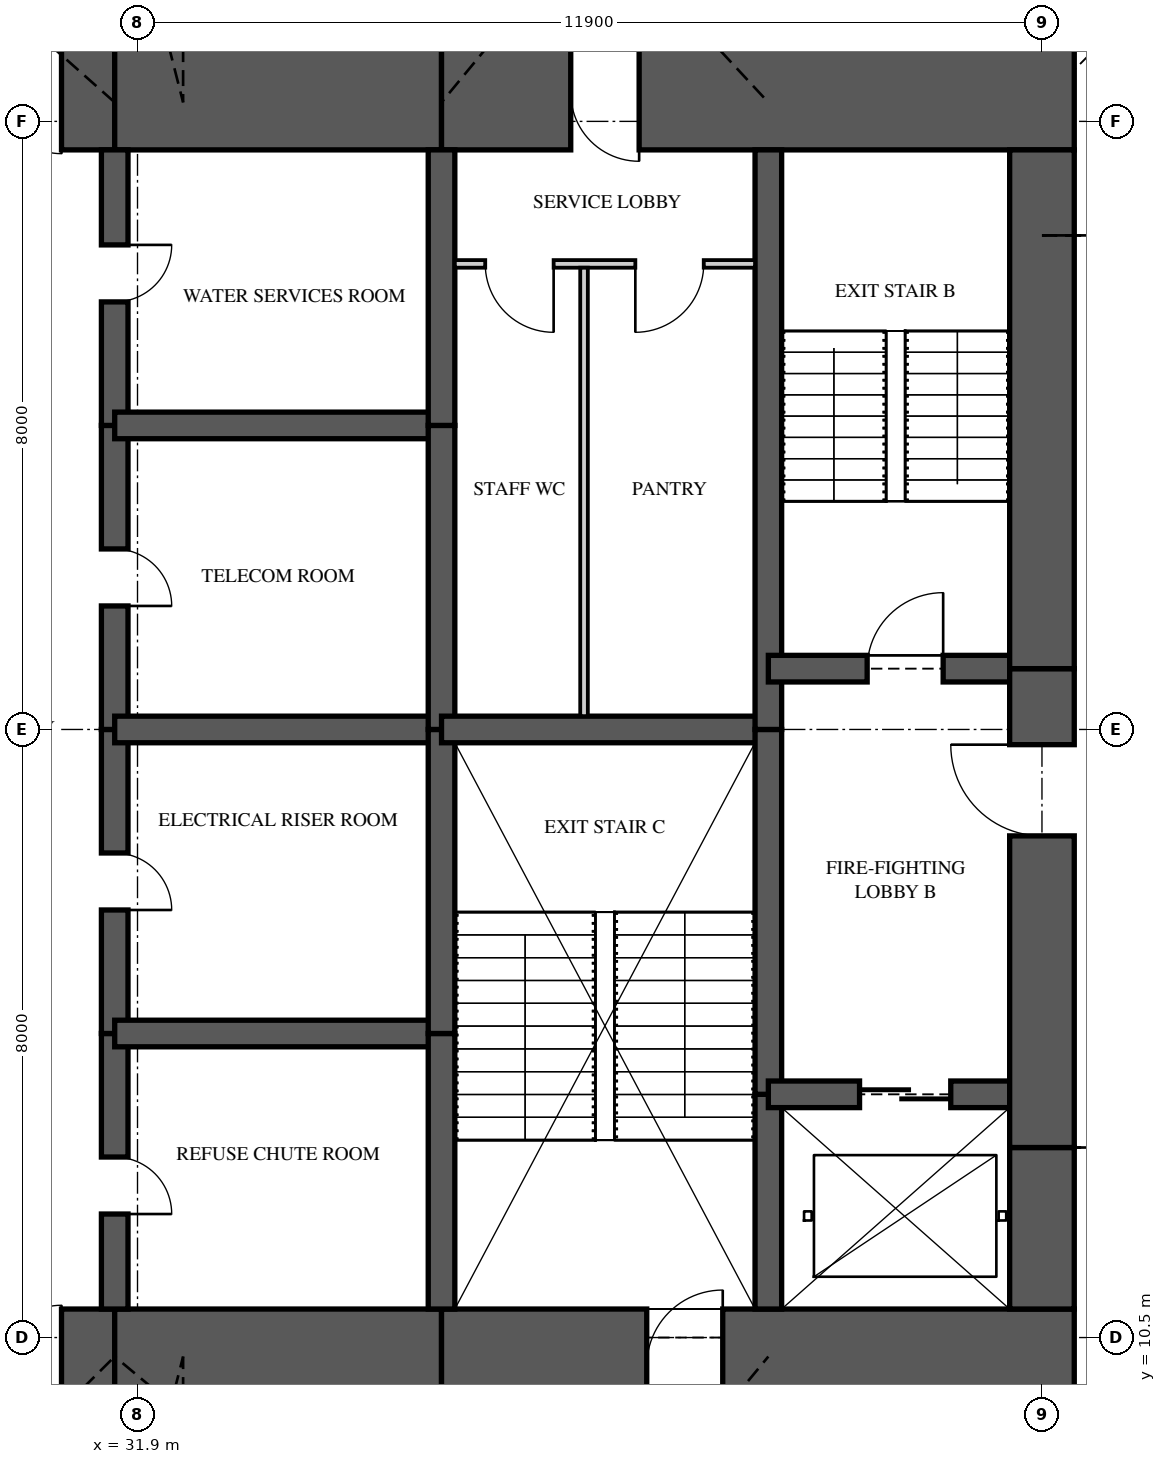
"""IFC4 building model, lengths in metres.
Left out: names, types, materials, properties, quantities, classifications, styles, units other than length and angle.
Written with IfcOpenShell. Run it as: python <this file> out.ifc"""

import sys

from ifc_helpers import new_model, si_unit, direction, frame, frame_2d, origin, place, context, subcontext, project, spatial, rectangle, extrude, element, fill, save


model = new_model("IFC4")
c1 = context("Model", 3, precision=1e-05, world=origin(), true_north=direction((0.0, 1.0)))
c2 = subcontext(c1, "Body", "Model", "MODEL_VIEW")
j1 = project(units=[si_unit("LENGTHUNIT", "METRE"), si_unit("PLANEANGLEUNIT", "RADIAN")], contexts=[c1])
p1 = place(None, origin())
s1 = spatial("IfcSite", under=j1, at=p1, CompositionType="ELEMENT")
p2 = place(p1, origin())
s2 = spatial("IfcBuilding", under=s1, at=p2, CompositionType="ELEMENT")
p3 = place(p2, frame((0.0, 0.0, 149.35)))
s3 = spatial("IfcBuildingStorey", under=s2, at=p3, CompositionType="ELEMENT", Elevation=149.35)
p4 = place(p3, frame((26.0, 10.125, 0.0), z_axis=(0.0, 0.0, 1.0), x_axis=(1.0, 0.0, 0.0)))
e1 = element("IfcWall", 1, at=p4, inside=s3, PredefinedType="SHEAR", context=c2, shape_type="SweptSolid", body=[
    extrude(rectangle(XDim=5.6, YDim=1.5, at=frame_2d((2.8, 0.0))), origin(), (0.0, 0.0, 1.0), 5.0),
])
p5 = place(p4, frame((3.3, 0.0, 0.0)))
e2 = element("IfcOpeningElement", 2, at=p5, cuts=e1, PredefinedType="OPENING", context=c2, shape_type="SweptSolid", body=[
    extrude(rectangle(XDim=1.6, YDim=2.1, at=frame_2d((0.8, 1.05))), frame((0.0, 0.76, 0.0), z_axis=(0.0, -1.0, 0.0), x_axis=(1.0, 0.0, 0.0)), (0.0, 0.0, 1.0), 1.52),
])
p6 = place(p3, frame((31.6, 10.125, 0.0), z_axis=(0.0, 0.0, 1.0), x_axis=(1.0, 0.0, 0.0)))
e3 = element("IfcWall", 3, at=p6, inside=s3, PredefinedType="SHEAR", context=c2, shape_type="SweptSolid", body=[
    extrude(rectangle(XDim=4.3, YDim=1.5, at=frame_2d((2.15, 0.0))), origin(), (0.0, 0.0, 1.0), 5.0),
])
p7 = place(p3, frame((35.9, 10.125, 0.0), z_axis=(0.0, 0.0, 1.0), x_axis=(1.0, 0.0, 0.0)))
e4 = element("IfcWall", 4, at=p7, inside=s3, PredefinedType="SHEAR", context=c2, shape_type="SweptSolid", body=[
    extrude(rectangle(XDim=8.325, YDim=1.5, at=frame_2d((4.163, 0.0))), origin(), (0.0, 0.0, 1.0), 5.0),
])
p8 = place(p7, frame((2.7, 0.0, 0.0)))
e5 = element("IfcOpeningElement", 5, at=p8, cuts=e4, PredefinedType="OPENING", context=c2, shape_type="SweptSolid", body=[
    extrude(rectangle(XDim=1.0, YDim=2.1, at=frame_2d((0.5, 1.05))), frame((0.0, 0.76, 0.0), z_axis=(0.0, -1.0, 0.0), x_axis=(1.0, 0.0, 0.0)), (0.0, 0.0, 1.0), 1.52),
])
p9 = place(p3, frame((44.225, 26.875, 0.0), z_axis=(0.0, 0.0, 1.0), x_axis=(-1.0, 0.0, 0.0)))
e6 = element("IfcWall", 6, at=p9, inside=s3, PredefinedType="SHEAR", context=c2, shape_type="SweptSolid", body=[
    extrude(rectangle(XDim=8.325, YDim=1.5, at=frame_2d((4.163, 0.0))), origin(), (0.0, 0.0, 1.0), 5.0),
])
p10 = place(p9, frame((5.725, 0.0, 0.0)))
e7 = element("IfcOpeningElement", 7, at=p10, cuts=e6, PredefinedType="OPENING", context=c2, shape_type="SweptSolid", body=[
    extrude(rectangle(XDim=0.9, YDim=2.1, at=frame_2d((0.45, 1.05))), frame((0.0, 0.76, 0.0), z_axis=(0.0, -1.0, 0.0), x_axis=(1.0, 0.0, 0.0)), (0.0, 0.0, 1.0), 1.52),
])
p11 = place(p3, frame((35.9, 26.875, 0.0), z_axis=(0.0, 0.0, 1.0), x_axis=(-1.0, 0.0, 0.0)))
e8 = element("IfcWall", 8, at=p11, inside=s3, PredefinedType="SHEAR", context=c2, shape_type="SweptSolid", body=[
    extrude(rectangle(XDim=4.3, YDim=1.5, at=frame_2d((2.15, 0.0))), origin(), (0.0, 0.0, 1.0), 5.0),
])
p12 = place(p3, frame((31.6, 26.875, 0.0), z_axis=(0.0, 0.0, 1.0), x_axis=(-1.0, 0.0, 0.0)))
e9 = element("IfcWall", 9, at=p12, inside=s3, PredefinedType="SHEAR", context=c2, shape_type="SweptSolid", body=[
    extrude(rectangle(XDim=5.6, YDim=1.5, at=frame_2d((2.8, 0.0))), origin(), (0.0, 0.0, 1.0), 5.0),
])
p13 = place(p12, frame((0.7, 0.0, 0.0)))
e10 = element("IfcOpeningElement", 10, at=p13, cuts=e9, PredefinedType="OPENING", context=c2, shape_type="SweptSolid", body=[
    extrude(rectangle(XDim=1.6, YDim=2.1, at=frame_2d((0.8, 1.05))), frame((0.0, 0.76, 0.0), z_axis=(0.0, -1.0, 0.0), x_axis=(1.0, 0.0, 0.0)), (0.0, 0.0, 1.0), 1.52),
])
p14 = place(p3, frame((43.8, 10.875, 0.0), z_axis=(0.0, 0.0, 1.0), x_axis=(0.0, 1.0, 0.0)))
e11 = element("IfcWall", 11, at=p14, inside=s3, PredefinedType="SHEAR", context=c2, shape_type="SweptSolid", body=[
    extrude(rectangle(XDim=2.125, YDim=0.85, at=frame_2d((1.062, 0.0))), origin(), (0.0, 0.0, 1.0), 5.0),
])
p15 = place(p3, frame((43.8, 13.0, 0.0), z_axis=(0.0, 0.0, 1.0), x_axis=(0.0, 1.0, 0.0)))
e12 = element("IfcWall", 12, at=p15, inside=s3, PredefinedType="SHEAR", context=c2, shape_type="SweptSolid", body=[
    extrude(rectangle(XDim=6.3, YDim=0.85, at=frame_2d((3.15, 0.0))), origin(), (0.0, 0.0, 1.0), 5.0),
])
p16 = place(p15, frame((4.1, 0.0, 0.0)))
e13 = element("IfcOpeningElement", 13, at=p16, cuts=e12, PredefinedType="OPENING", context=c2, shape_type="SweptSolid", body=[
    extrude(rectangle(XDim=1.2, YDim=2.2, at=frame_2d((0.6, 1.1))), frame((0.0, 0.435, 0.0), z_axis=(0.0, -1.0, 0.0), x_axis=(1.0, 0.0, 0.0)), (0.0, 0.0, 1.0), 0.87),
])
p17 = place(p3, frame((43.8, 19.3, 0.0), z_axis=(0.0, 0.0, 1.0), x_axis=(0.0, 1.0, 0.0)))
e14 = element("IfcWall", 14, at=p17, inside=s3, PredefinedType="SHEAR", context=c2, shape_type="SweptSolid", body=[
    extrude(rectangle(XDim=6.825, YDim=0.85, at=frame_2d((3.413, 0.0))), origin(), (0.0, 0.0, 1.0), 5.0),
])
p18 = place(p3, frame((31.6, 10.875, 0.0), z_axis=(0.0, 0.0, 1.0), x_axis=(0.0, 1.0, 0.0)))
e15 = element("IfcWall", 15, at=p18, inside=s3, PredefinedType="SHEAR", context=c2, shape_type="SweptSolid", body=[
    extrude(rectangle(XDim=3.625, YDim=0.35, at=frame_2d((1.812, 0.0))), origin(), (0.0, 0.0, 1.0), 5.0),
])
p19 = place(p18, frame((1.25, 0.0, 0.0)))
e16 = element("IfcOpeningElement", 16, at=p19, cuts=e15, PredefinedType="OPENING", context=c2, shape_type="SweptSolid", body=[
    extrude(rectangle(XDim=0.75, YDim=2.1, at=frame_2d((0.375, 1.05))), frame((0.0, 0.185, 0.0), z_axis=(0.0, -1.0, 0.0), x_axis=(1.0, 0.0, 0.0)), (0.0, 0.0, 1.0), 0.37),
])
p20 = place(p3, frame((31.6, 14.5, 0.0), z_axis=(0.0, 0.0, 1.0), x_axis=(0.0, 1.0, 0.0)))
e17 = element("IfcWall", 17, at=p20, inside=s3, PredefinedType="SHEAR", context=c2, shape_type="SweptSolid", body=[
    extrude(rectangle(XDim=4.0, YDim=0.35, at=frame_2d((2.0, 0.0))), origin(), (0.0, 0.0, 1.0), 5.0),
])
p21 = place(p20, frame((1.625, 0.0, 0.0)))
e18 = element("IfcOpeningElement", 18, at=p21, cuts=e17, PredefinedType="OPENING", context=c2, shape_type="SweptSolid", body=[
    extrude(rectangle(XDim=0.75, YDim=2.1, at=frame_2d((0.375, 1.05))), frame((0.0, 0.185, 0.0), z_axis=(0.0, -1.0, 0.0), x_axis=(1.0, 0.0, 0.0)), (0.0, 0.0, 1.0), 0.37),
])
p22 = place(p3, frame((31.6, 18.5, 0.0), z_axis=(0.0, 0.0, 1.0), x_axis=(0.0, 1.0, 0.0)))
e19 = element("IfcWall", 19, at=p22, inside=s3, PredefinedType="SHEAR", context=c2, shape_type="SweptSolid", body=[
    extrude(rectangle(XDim=4.0, YDim=0.35, at=frame_2d((2.0, 0.0))), origin(), (0.0, 0.0, 1.0), 5.0),
])
p23 = place(p22, frame((1.625, 0.0, 0.0)))
e20 = element("IfcOpeningElement", 20, at=p23, cuts=e19, PredefinedType="OPENING", context=c2, shape_type="SweptSolid", body=[
    extrude(rectangle(XDim=0.75, YDim=2.1, at=frame_2d((0.375, 1.05))), frame((0.0, 0.185, 0.0), z_axis=(0.0, -1.0, 0.0), x_axis=(1.0, 0.0, 0.0)), (0.0, 0.0, 1.0), 0.37),
])
p24 = place(p3, frame((31.6, 22.5, 0.0), z_axis=(0.0, 0.0, 1.0), x_axis=(0.0, 1.0, 0.0)))
e21 = element("IfcWall", 21, at=p24, inside=s3, PredefinedType="SHEAR", context=c2, shape_type="SweptSolid", body=[
    extrude(rectangle(XDim=3.625, YDim=0.35, at=frame_2d((1.812, 0.0))), origin(), (0.0, 0.0, 1.0), 5.0),
])
p25 = place(p24, frame((1.625, 0.0, 0.0)))
e22 = element("IfcOpeningElement", 22, at=p25, cuts=e21, PredefinedType="OPENING", context=c2, shape_type="SweptSolid", body=[
    extrude(rectangle(XDim=0.75, YDim=2.1, at=frame_2d((0.375, 1.05))), frame((0.0, 0.185, 0.0), z_axis=(0.0, -1.0, 0.0), x_axis=(1.0, 0.0, 0.0)), (0.0, 0.0, 1.0), 0.37),
])
p26 = place(p3, frame((35.9, 10.875, 0.0), z_axis=(0.0, 0.0, 1.0), x_axis=(0.0, 1.0, 0.0)))
e23 = element("IfcWall", 23, at=p26, inside=s3, PredefinedType="SHEAR", context=c2, shape_type="SweptSolid", body=[
    extrude(rectangle(XDim=3.625, YDim=0.35, at=frame_2d((1.812, 0.0))), origin(), (0.0, 0.0, 1.0), 5.0),
])
for number, where, z_axis, x_axis in (
    (24, (35.9, 14.5, 0.0), (0.0, 0.0, 1.0), (0.0, 1.0, 0.0)),
    (25, (35.9, 18.5, 0.0), (0.0, 0.0, 1.0), (0.0, 1.0, 0.0)),
):
    element("IfcWall", number, at=place(p3, frame(where, z_axis=z_axis, x_axis=x_axis)), inside=s3, PredefinedType="SHEAR", context=c2, shape_type="SweptSolid", body=[
        extrude(rectangle(XDim=4.0, YDim=0.35, at=frame_2d((2.0, 0.0))), origin(), (0.0, 0.0, 1.0), 5.0),
    ])
p27 = place(p3, frame((35.9, 22.5, 0.0), z_axis=(0.0, 0.0, 1.0), x_axis=(0.0, 1.0, 0.0)))
e26 = element("IfcWall", 26, at=p27, inside=s3, PredefinedType="SHEAR", context=c2, shape_type="SweptSolid", body=[
    extrude(rectangle(XDim=3.625, YDim=0.35, at=frame_2d((1.812, 0.0))), origin(), (0.0, 0.0, 1.0), 5.0),
])
p28 = place(p3, frame((40.2, 10.875, 0.0), z_axis=(0.0, 0.0, 1.0), x_axis=(0.0, 1.0, 0.0)))
e27 = element("IfcWall", 27, at=p28, inside=s3, PredefinedType="SHEAR", context=c2, shape_type="SweptSolid", body=[
    extrude(rectangle(XDim=2.825, YDim=0.35, at=frame_2d((1.413, 0.0))), origin(), (0.0, 0.0, 1.0), 5.0),
])
p29 = place(p3, frame((40.2, 13.7, 0.0), z_axis=(0.0, 0.0, 1.0), x_axis=(0.0, 1.0, 0.0)))
e28 = element("IfcWall", 28, at=p29, inside=s3, PredefinedType="SHEAR", context=c2, shape_type="SweptSolid", body=[
    extrude(rectangle(XDim=4.8, YDim=0.35, at=frame_2d((2.4, 0.0))), origin(), (0.0, 0.0, 1.0), 5.0),
])
p30 = place(p3, frame((40.2, 18.5, 0.0), z_axis=(0.0, 0.0, 1.0), x_axis=(0.0, 1.0, 0.0)))
e29 = element("IfcWall", 29, at=p30, inside=s3, PredefinedType="SHEAR", context=c2, shape_type="SweptSolid", body=[
    extrude(rectangle(XDim=7.625, YDim=0.35, at=frame_2d((3.812, 0.0))), origin(), (0.0, 0.0, 1.0), 5.0),
])
for number, where, z_axis, x_axis in (
    (30, (31.6, 14.5, 0.0), (0.0, 0.0, 1.0), (1.0, 0.0, 0.0)),
    (31, (31.6, 18.5, 0.0), (0.0, 0.0, 1.0), (1.0, 0.0, 0.0)),
    (32, (31.6, 22.5, 0.0), (0.0, 0.0, 1.0), (1.0, 0.0, 0.0)),
):
    element("IfcWall", number, at=place(p3, frame(where, z_axis=z_axis, x_axis=x_axis)), inside=s3, PredefinedType="SHEAR", context=c2, shape_type="SweptSolid", body=[
        extrude(rectangle(XDim=4.3, YDim=0.35, at=frame_2d((2.15, 0.0))), origin(), (0.0, 0.0, 1.0), 5.0),
    ])
p31 = place(p3, frame((35.9, 18.5, 0.0), z_axis=(0.0, 0.0, 1.0), x_axis=(1.0, 0.0, 0.0)))
e33 = element("IfcWall", 33, at=p31, inside=s3, PredefinedType="SHEAR", context=c2, shape_type="SweptSolid", body=[
    extrude(rectangle(XDim=4.3, YDim=0.35, at=frame_2d((2.15, 0.0))), origin(), (0.0, 0.0, 1.0), 5.0),
])
p32 = place(p3, frame((40.2, 13.7, 0.0), z_axis=(0.0, 0.0, 1.0), x_axis=(1.0, 0.0, 0.0)))
e34 = element("IfcWall", 34, at=p32, inside=s3, PredefinedType="SHEAR", context=c2, shape_type="SweptSolid", body=[
    extrude(rectangle(XDim=3.6, YDim=0.35, at=frame_2d((1.8, 0.0))), origin(), (0.0, 0.0, 1.0), 5.0),
])
p33 = place(p32, frame((1.2, 0.0, 0.0)))
e35 = element("IfcOpeningElement", 35, at=p33, cuts=e34, PredefinedType="OPENING", context=c2, shape_type="SweptSolid", body=[
    extrude(rectangle(XDim=1.2, YDim=2.1, at=frame_2d((0.6, 1.05))), frame((0.0, 0.185, 0.0), z_axis=(0.0, -1.0, 0.0), x_axis=(1.0, 0.0, 0.0)), (0.0, 0.0, 1.0), 0.37),
])
p34 = place(p3, frame((40.2, 19.3, 0.0), z_axis=(0.0, 0.0, 1.0), x_axis=(1.0, 0.0, 0.0)))
e36 = element("IfcWall", 36, at=p34, inside=s3, PredefinedType="SHEAR", context=c2, shape_type="SweptSolid", body=[
    extrude(rectangle(XDim=3.6, YDim=0.35, at=frame_2d((1.8, 0.0))), origin(), (0.0, 0.0, 1.0), 5.0),
])
p35 = place(p34, frame((1.3, 0.0, 0.0)))
e37 = element("IfcOpeningElement", 37, at=p35, cuts=e36, PredefinedType="OPENING", context=c2, shape_type="SweptSolid", body=[
    extrude(rectangle(XDim=1.0, YDim=2.1, at=frame_2d((0.5, 1.05))), frame((0.0, 0.185, 0.0), z_axis=(0.0, -1.0, 0.0), x_axis=(1.0, 0.0, 0.0)), (0.0, 0.0, 1.0), 0.37),
])
p36 = place(p3, frame((36.075, 24.625, 0.0), z_axis=(0.0, 0.0, 1.0), x_axis=(1.0, 0.0, 0.0)))
e38 = element("IfcWall", 38, at=p36, inside=s3, PredefinedType="PARTITIONING", context=c2, shape_type="SweptSolid", body=[
    extrude(rectangle(XDim=3.95, YDim=0.1, at=frame_2d((1.975, 0.0))), origin(), (0.0, 0.0, 1.0), 4.72),
])
p37 = place(p36, frame((0.4, 0.0, 0.0)))
e39 = element("IfcOpeningElement", 39, at=p37, cuts=e38, PredefinedType="OPENING", context=c2, shape_type="SweptSolid", body=[
    extrude(rectangle(XDim=0.9, YDim=2.1, at=frame_2d((0.45, 1.05))), frame((0.0, 0.06, 0.0), z_axis=(0.0, -1.0, 0.0), x_axis=(1.0, 0.0, 0.0)), (0.0, 0.0, 1.0), 0.12),
])
p38 = place(p36, frame((2.375, 0.0, 0.0)))
e40 = element("IfcOpeningElement", 40, at=p38, cuts=e38, PredefinedType="OPENING", context=c2, shape_type="SweptSolid", body=[
    extrude(rectangle(XDim=0.9, YDim=2.1, at=frame_2d((0.45, 1.05))), frame((0.0, 0.06, 0.0), z_axis=(0.0, -1.0, 0.0), x_axis=(1.0, 0.0, 0.0)), (0.0, 0.0, 1.0), 0.12),
])
p39 = place(p3, frame((37.775, 18.675, 0.0), z_axis=(0.0, 0.0, 1.0), x_axis=(0.0, 1.0, 0.0)))
e41 = element("IfcWall", 41, at=p39, inside=s3, PredefinedType="PARTITIONING", context=c2, shape_type="SweptSolid", body=[
    extrude(rectangle(XDim=5.9, YDim=0.1, at=frame_2d((2.95, 0.0))), origin(), (0.0, 0.0, 1.0), 4.72),
])
p40 = place(p37, frame((0.9, 0.0, 0.0), z_axis=(0.0, 0.0, 1.0), x_axis=(-1.0, 0.0, 0.0)))
e42 = element("IfcDoor", 42, at=p40, inside=s3, OperationType="SINGLE_SWING_LEFT", PredefinedType="DOOR", context=c2, shape_type="SweptSolid", body=[
    extrude(rectangle(XDim=0.9, YDim=2.1, at=frame_2d((0.45, 1.05))), frame((0.0, 0.025, 0.0), z_axis=(0.0, -1.0, 0.0), x_axis=(1.0, 0.0, 0.0)), (0.0, 0.0, 1.0), 0.05),
])
fill(e39, e42)
p41 = place(p38, frame((0.9, 0.0, 0.0), z_axis=(0.0, 0.0, 1.0), x_axis=(-1.0, 0.0, 0.0)))
e43 = element("IfcDoor", 43, at=p41, inside=s3, OperationType="SINGLE_SWING_RIGHT", PredefinedType="DOOR", context=c2, shape_type="SweptSolid", body=[
    extrude(rectangle(XDim=0.9, YDim=2.1, at=frame_2d((0.45, 1.05))), frame((0.0, 0.025, 0.0), z_axis=(0.0, -1.0, 0.0), x_axis=(1.0, 0.0, 0.0)), (0.0, 0.0, 1.0), 0.05),
])
fill(e40, e43)
p42 = place(p35, origin())
e44 = element("IfcDoor", 44, at=p42, inside=s3, OperationType="SINGLE_SWING_RIGHT", PredefinedType="DOOR", context=c2, shape_type="SweptSolid", body=[
    extrude(rectangle(XDim=1.0, YDim=2.1, at=frame_2d((0.5, 1.05))), frame((0.0, 0.025, 0.0), z_axis=(0.0, -1.0, 0.0), x_axis=(1.0, 0.0, 0.0)), (0.0, 0.0, 1.0), 0.05),
])
fill(e37, e44)
p43 = place(p16, origin())
e45 = element("IfcDoor", 45, at=p43, inside=s3, OperationType="SINGLE_SWING_RIGHT", PredefinedType="DOOR", context=c2, shape_type="SweptSolid", body=[
    extrude(rectangle(XDim=1.2, YDim=2.2, at=frame_2d((0.6, 1.1))), frame((0.0, 0.025, 0.0), z_axis=(0.0, -1.0, 0.0), x_axis=(1.0, 0.0, 0.0)), (0.0, 0.0, 1.0), 0.05),
])
fill(e13, e45)
p44 = place(p33, origin())
e46 = element("IfcDoor", 46, at=p44, inside=s3, OperationType="SLIDING_TO_LEFT", PredefinedType="DOOR", context=c2, shape_type="SweptSolid", body=[
    extrude(rectangle(XDim=1.2, YDim=2.1, at=frame_2d((0.6, 1.05))), frame((0.0, 0.025, 0.0), z_axis=(0.0, -1.0, 0.0), x_axis=(1.0, 0.0, 0.0)), (0.0, 0.0, 1.0), 0.05),
])
fill(e35, e46)
p45 = place(p5, origin())
e47 = element("IfcDoor", 47, at=p45, inside=s3, OperationType="DOUBLE_DOOR_SINGLE_SWING", PredefinedType="DOOR", context=c2, shape_type="SweptSolid", body=[
    extrude(rectangle(XDim=1.6, YDim=2.1, at=frame_2d((0.8, 1.05))), frame((0.0, 0.025, 0.0), z_axis=(0.0, -1.0, 0.0), x_axis=(1.0, 0.0, 0.0)), (0.0, 0.0, 1.0), 0.05),
])
fill(e2, e47)
p46 = place(p13, origin())
e48 = element("IfcDoor", 48, at=p46, inside=s3, OperationType="DOUBLE_DOOR_SINGLE_SWING", PredefinedType="DOOR", context=c2, shape_type="SweptSolid", body=[
    extrude(rectangle(XDim=1.6, YDim=2.1, at=frame_2d((0.8, 1.05))), frame((0.0, 0.025, 0.0), z_axis=(0.0, -1.0, 0.0), x_axis=(1.0, 0.0, 0.0)), (0.0, 0.0, 1.0), 0.05),
])
fill(e10, e48)
p47 = place(p19, frame((0.75, 0.0, 0.0), z_axis=(0.0, 0.0, 1.0), x_axis=(-1.0, 0.0, 0.0)))
e49 = element("IfcDoor", 49, at=p47, inside=s3, OperationType="SINGLE_SWING_RIGHT", PredefinedType="DOOR", context=c2, shape_type="SweptSolid", body=[
    extrude(rectangle(XDim=0.75, YDim=2.1, at=frame_2d((0.375, 1.05))), frame((0.0, 0.025, 0.0), z_axis=(0.0, -1.0, 0.0), x_axis=(1.0, 0.0, 0.0)), (0.0, 0.0, 1.0), 0.05),
])
fill(e16, e49)
p48 = place(p21, frame((0.75, 0.0, 0.0), z_axis=(0.0, 0.0, 1.0), x_axis=(-1.0, 0.0, 0.0)))
e50 = element("IfcDoor", 50, at=p48, inside=s3, OperationType="SINGLE_SWING_RIGHT", PredefinedType="DOOR", context=c2, shape_type="SweptSolid", body=[
    extrude(rectangle(XDim=0.75, YDim=2.1, at=frame_2d((0.375, 1.05))), frame((0.0, 0.025, 0.0), z_axis=(0.0, -1.0, 0.0), x_axis=(1.0, 0.0, 0.0)), (0.0, 0.0, 1.0), 0.05),
])
fill(e18, e50)
p49 = place(p23, frame((0.75, 0.0, 0.0), z_axis=(0.0, 0.0, 1.0), x_axis=(-1.0, 0.0, 0.0)))
e51 = element("IfcDoor", 51, at=p49, inside=s3, OperationType="SINGLE_SWING_RIGHT", PredefinedType="DOOR", context=c2, shape_type="SweptSolid", body=[
    extrude(rectangle(XDim=0.75, YDim=2.1, at=frame_2d((0.375, 1.05))), frame((0.0, 0.025, 0.0), z_axis=(0.0, -1.0, 0.0), x_axis=(1.0, 0.0, 0.0)), (0.0, 0.0, 1.0), 0.05),
])
fill(e20, e51)
p50 = place(p25, frame((0.75, 0.0, 0.0), z_axis=(0.0, 0.0, 1.0), x_axis=(-1.0, 0.0, 0.0)))
e52 = element("IfcDoor", 52, at=p50, inside=s3, OperationType="SINGLE_SWING_LEFT", PredefinedType="DOOR", context=c2, shape_type="SweptSolid", body=[
    extrude(rectangle(XDim=0.75, YDim=2.1, at=frame_2d((0.375, 1.05))), frame((0.0, 0.025, 0.0), z_axis=(0.0, -1.0, 0.0), x_axis=(1.0, 0.0, 0.0)), (0.0, 0.0, 1.0), 0.05),
])
fill(e22, e52)
p51 = place(p8, origin())
e53 = element("IfcDoor", 53, at=p51, inside=s3, OperationType="SINGLE_SWING_RIGHT", PredefinedType="DOOR", context=c2, shape_type="SweptSolid", body=[
    extrude(rectangle(XDim=1.0, YDim=2.1, at=frame_2d((0.5, 1.05))), frame((0.0, 0.025, 0.0), z_axis=(0.0, -1.0, 0.0), x_axis=(1.0, 0.0, 0.0)), (0.0, 0.0, 1.0), 0.05),
])
fill(e5, e53)
p52 = place(p10, origin())
e54 = element("IfcDoor", 54, at=p52, inside=s3, OperationType="SINGLE_SWING_LEFT", PredefinedType="DOOR", context=c2, shape_type="SweptSolid", body=[
    extrude(rectangle(XDim=0.9, YDim=2.1, at=frame_2d((0.45, 1.05))), frame((0.0, 0.47, 0.0), z_axis=(0.0, -1.0, 0.0), x_axis=(1.0, 0.0, 0.0)), (0.0, 0.0, 1.0), 0.8),
])
fill(e7, e54)
save(model, sys.argv[1])
